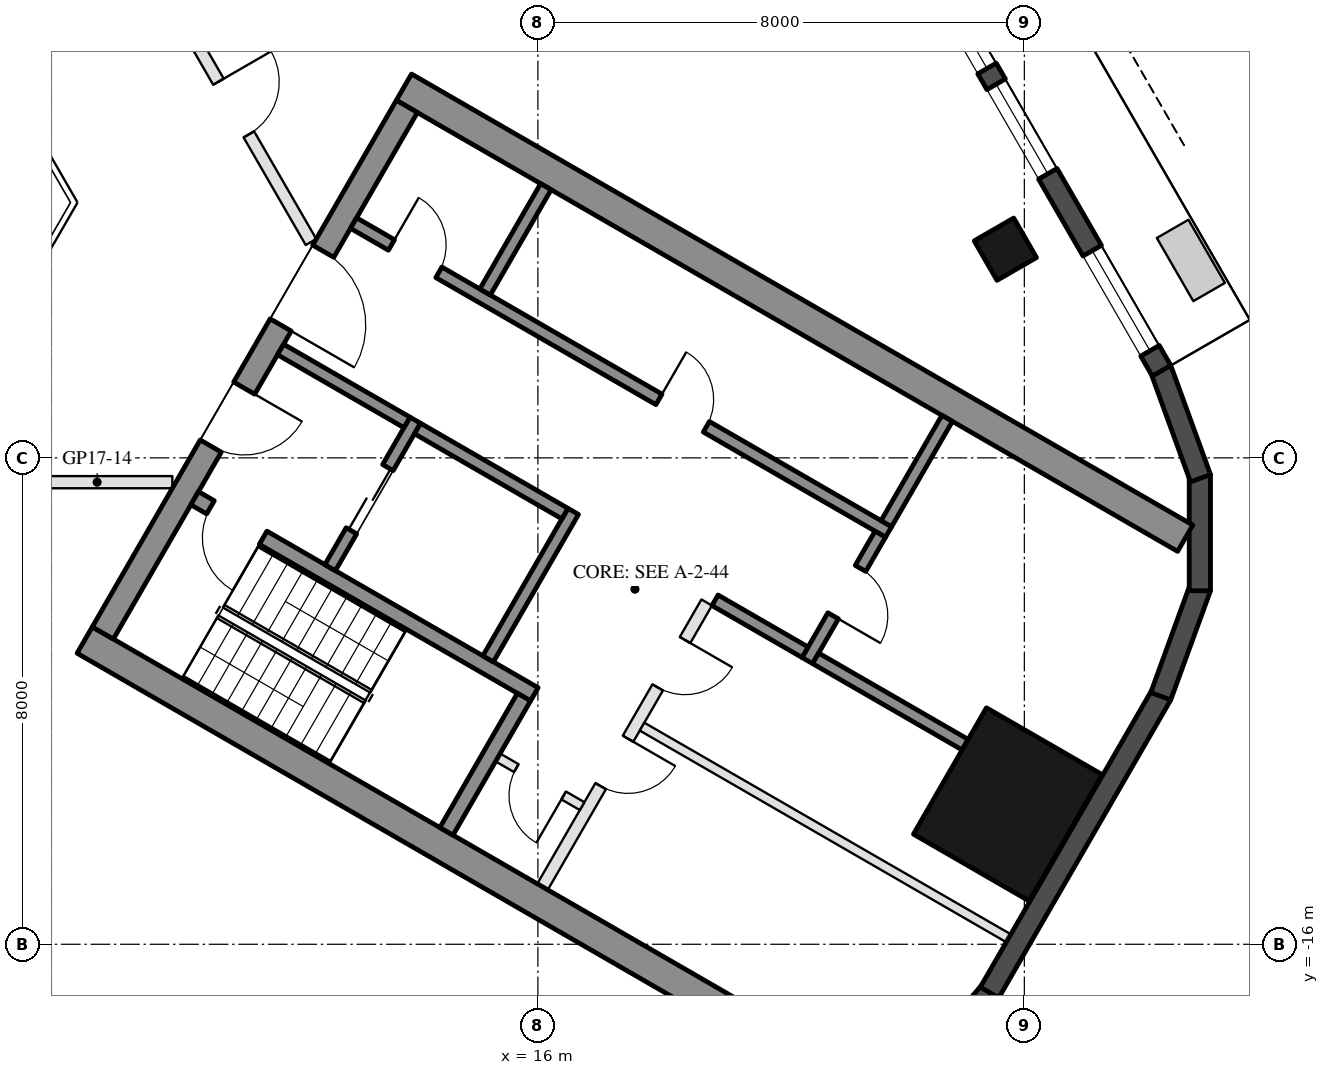
"""IFC4 building model, lengths in metres.
Left out: names, types, materials, properties, quantities, classifications, styles, units other than length and angle.
Written with IfcOpenShell. Run it as: python <this file> out.ifc"""

import sys

from ifc_helpers import new_model, si_unit, direction, frame, frame_2d, origin, origin_2d, place, context, subcontext, project, spatial, rectangle, hollow_rectangle, extrude, element, fill, save


model = new_model("IFC4")
c1 = context("Model", 3, precision=1e-05, world=origin(), true_north=direction((0.0, 1.0)))
c2 = subcontext(c1, "Body", "Model", "MODEL_VIEW")
j1 = project(units=[si_unit("LENGTHUNIT", "METRE"), si_unit("PLANEANGLEUNIT", "RADIAN")], contexts=[c1])
p1 = place(None, origin())
s1 = spatial("IfcSite", under=j1, at=p1, CompositionType="ELEMENT")
p2 = place(p1, origin())
s2 = spatial("IfcBuilding", under=s1, at=p2, CompositionType="ELEMENT")
p3 = place(p2, frame((0.0, 0.0, 187.3)))
s3 = spatial("IfcBuildingStorey", under=s2, at=p3, CompositionType="ELEMENT", Elevation=187.3)
p4 = place(p3, frame((23.688, -4.568, 0.0), z_axis=(0.0, 0.0, 1.0), x_axis=(-0.5, 0.866025403784, 0.0)))
e1 = element("IfcColumn", 1, at=p4, inside=s3, PredefinedType="COLUMN", context=c2, shape_type="SweptSolid", body=[
    extrude(hollow_rectangle(XDim=0.75, YDim=0.75, WallThickness=0.035, at=origin_2d()), origin(), (0.0, 0.0, 1.0), 3.7),
])
p5 = place(p3, frame((23.729, -13.7, 0.0), z_axis=(0.0, 0.0, 1.0), x_axis=(0.5, 0.866025403784, 0.0)))
e2 = element("IfcColumn", 2, at=p5, inside=s3, PredefinedType="COLUMN", context=c2, shape_type="SweptSolid", body=[
    extrude(hollow_rectangle(XDim=2.4, YDim=2.2, WallThickness=0.06, at=origin_2d()), origin(), (0.0, 0.0, 1.0), 3.7),
])
p6 = place(p3, frame((22.217, -18.231, 0.0), z_axis=(0.0, 0.0, 1.0), x_axis=(0.642733291068, 0.76609001857, 0.0)))
e3 = element("IfcWall", 3, at=p6, inside=s3, PredefinedType="SOLIDWALL", context=c2, shape_type="SweptSolid", body=[
    extrude(rectangle(XDim=1.91, YDim=0.35, at=frame_2d((0.955, 0.0))), origin(), (0.0, 0.0, 1.0), 3.55),
])
p7 = place(p3, frame((23.427, -16.792, 0.0), z_axis=(0.0, 0.0, 1.0), x_axis=(0.500018773155, 0.866014564827, 0.0)))
e4 = element("IfcWall", 4, at=p7, inside=s3, PredefinedType="SOLIDWALL", context=c2, shape_type="SweptSolid", body=[
    extrude(rectangle(XDim=5.658, YDim=0.35, at=frame_2d((2.829, 0.0))), origin(), (0.0, 0.0, 1.0), 3.55),
])
for number, where, z_axis, x_axis in (
    (5, (26.244, -11.92, 0.0), (0.0, 0.0, 1.0), (0.342, 0.94, 0.0)),
    (6, (26.886, -10.185, 0.0), (0.0, 0.0, 1.0), (0.0, 1.0, 0.0)),
    (7, (26.897, -8.335, 0.0), (0.0, 0.0, 1.0), (-0.342, 0.94, 0.0)),
):
    element("IfcWall", number, at=place(p3, frame(where, z_axis=z_axis, x_axis=x_axis)), inside=s3, PredefinedType="SOLIDWALL", context=c2, shape_type="SweptSolid", body=[
        extrude(rectangle(XDim=1.91, YDim=0.35, at=frame_2d((0.955, 0.0))), origin(), (0.0, 0.0, 1.0), 3.55),
    ])
p8 = place(p3, frame((26.257, -6.567, 0.0), z_axis=(0.0, 0.0, 1.0), x_axis=(-0.500023526245, 0.866011820475, 0.0)))
e8 = element("IfcWall", 8, at=p8, inside=s3, PredefinedType="SOLIDWALL", context=c2, shape_type="SweptSolid", body=[
    extrude(rectangle(XDim=11.816, YDim=0.35, at=frame_2d((5.908, 0.0))), origin(), (0.0, 0.0, 1.0), 3.55),
])
p9 = place(p8, frame((0.38, 0.0, 0.3)))
e9 = element("IfcOpeningElement", 9, at=p9, cuts=e8, PredefinedType="OPENING", context=c2, shape_type="SweptSolid", body=[
    extrude(rectangle(XDim=1.9, YDim=2.65, at=frame_2d((0.95, 1.325))), frame((0.0, 0.185, 0.0), z_axis=(0.0, -1.0, 0.0), x_axis=(1.0, 0.0, 0.0)), (0.0, 0.0, 1.0), 0.37),
])
p10 = place(p8, frame((7.791, 0.0, 0.0)))
e10 = element("IfcOpeningElement", 10, at=p10, cuts=e8, PredefinedType="OPENING", context=c2, shape_type="SweptSolid", body=[
    extrude(rectangle(XDim=2.4, YDim=2.4, at=frame_2d((1.2, 1.2))), frame((0.0, 0.185, 0.0), z_axis=(0.0, -1.0, 0.0), x_axis=(1.0, 0.0, 0.0)), (0.0, 0.0, 1.0), 0.37),
])
p11 = place(p8, frame((3.741, 0.0, 0.3)))
e11 = element("IfcOpeningElement", 11, at=p11, cuts=e8, PredefinedType="OPENING", context=c2, shape_type="SweptSolid", body=[
    extrude(rectangle(XDim=1.7, YDim=2.65, at=frame_2d((0.85, 1.325))), frame((0.0, 0.185, 0.0), z_axis=(0.0, -1.0, 0.0), x_axis=(1.0, 0.0, 0.0)), (0.0, 0.0, 1.0), 0.37),
])
p12 = place(p8, frame((5.741, 0.0, 0.3)))
e12 = element("IfcOpeningElement", 12, at=p12, cuts=e8, PredefinedType="OPENING", context=c2, shape_type="SweptSolid", body=[
    extrude(rectangle(XDim=1.7, YDim=2.65, at=frame_2d((0.85, 1.325))), frame((0.0, 0.185, 0.0), z_axis=(0.0, -1.0, 0.0), x_axis=(1.0, 0.0, 0.0)), (0.0, 0.0, 1.0), 0.37),
])
for number, where, z_axis, x_axis in (
    (13, (8.547, -10.997, 0.0), (0.0, 0.0, 1.0), (0.866, -0.5, 0.0)),
    (14, (13.797, -1.903, 0.0), (0.0, 0.0, 1.0), (0.866, -0.5, 0.0)),
):
    element("IfcWall", number, at=place(p3, frame(where, z_axis=z_axis, x_axis=x_axis)), inside=s3, PredefinedType="SHEAR", context=c2, shape_type="SweptSolid", body=[
        extrude(rectangle(XDim=14.837, YDim=0.5, at=frame_2d((7.418, 0.0))), origin(), (0.0, 0.0, 1.0), 3.5),
    ])
p13 = place(p3, frame((8.845, -10.88, 0.0), z_axis=(0.0, 0.0, 1.0), x_axis=(0.500004234368, 0.866022959057, 0.0)))
e15 = element("IfcWall", 15, at=p13, inside=s3, PredefinedType="SHEAR", context=c2, shape_type="SweptSolid", body=[
    extrude(rectangle(XDim=10.0, YDim=0.4, at=frame_2d((5.0, 0.0))), origin(), (0.0, 0.0, 1.0), 3.5),
])
p14 = place(p13, frame((3.55, 0.0, 0.0)))
e16 = element("IfcOpeningElement", 16, at=p14, cuts=e15, PredefinedType="OPENING", context=c2, shape_type="SweptSolid", body=[
    extrude(rectangle(XDim=1.1, YDim=2.1, at=frame_2d((0.55, 1.05))), frame((0.0, 0.21, 0.0), z_axis=(0.0, -1.0, 0.0), x_axis=(1.0, 0.0, 0.0)), (0.0, 0.0, 1.0), 0.42),
])
p15 = place(p13, frame((5.85, 0.0, 0.0)))
e17 = element("IfcOpeningElement", 17, at=p15, cuts=e15, PredefinedType="OPENING", context=c2, shape_type="SweptSolid", body=[
    extrude(rectangle(XDim=1.4, YDim=2.1, at=frame_2d((0.7, 1.05))), frame((0.0, 0.21, 0.0), z_axis=(0.0, -1.0, 0.0), x_axis=(1.0, 0.0, 0.0)), (0.0, 0.0, 1.0), 0.42),
])
p16 = place(p3, frame((10.356, -8.664, 0.0), z_axis=(0.0, 0.0, 1.0), x_axis=(0.866028629588, -0.499994412703, 0.0)))
e18 = element("IfcWall", 18, at=p16, inside=s3, PredefinedType="SHEAR", context=c2, shape_type="SweptSolid", body=[
    extrude(rectangle(XDim=6.45, YDim=0.25, at=frame_2d((3.225, 0.0))), origin(), (0.0, 0.0, 1.0), 3.5),
])
p17 = place(p16, frame((0.3, 0.0, 0.0)))
e19 = element("IfcOpeningElement", 19, at=p17, cuts=e18, PredefinedType="OPENING", context=c2, shape_type="SweptSolid", body=[
    extrude(rectangle(XDim=1.0, YDim=2.1, at=frame_2d((0.5, 1.05))), frame((0.0, 0.135, 0.0), z_axis=(0.0, -1.0, 0.0), x_axis=(1.0, 0.0, 0.0)), (0.0, 0.0, 1.0), 0.27),
])
p18 = place(p3, frame((14.496, -14.143, 0.0), z_axis=(0.0, 0.0, 1.0), x_axis=(0.500062241894, 0.865989465428, 0.0)))
e20 = element("IfcWall", 20, at=p18, inside=s3, PredefinedType="SHEAR", context=c2, shape_type="SweptSolid", body=[
    extrude(rectangle(XDim=2.55, YDim=0.25, at=frame_2d((1.275, 0.0))), origin(), (0.0, 0.0, 1.0), 3.5),
])
p19 = place(p3, frame((15.181, -11.305, 0.0), z_axis=(0.0, 0.0, 1.0), x_axis=(0.49994636267, 0.866056369097, 0.0)))
e21 = element("IfcWall", 21, at=p19, inside=s3, PredefinedType="SHEAR", context=c2, shape_type="SweptSolid", body=[
    extrude(rectangle(XDim=2.8, YDim=0.2, at=frame_2d((1.4, 0.0))), origin(), (0.0, 0.0, 1.0), 3.5),
])
p20 = place(p3, frame((12.583, -9.805, 0.0), z_axis=(0.0, 0.0, 1.0), x_axis=(0.49994636267, 0.866056369097, 0.0)))
e22 = element("IfcWall", 22, at=p20, inside=s3, PredefinedType="SHEAR", context=c2, shape_type="SweptSolid", body=[
    extrude(rectangle(XDim=2.8, YDim=0.2, at=frame_2d((1.4, 0.0))), origin(), (0.0, 0.0, 1.0), 3.5),
])
p21 = place(p20, frame((0.7, 0.0, 0.0)))
e23 = element("IfcOpeningElement", 23, at=p21, cuts=e22, PredefinedType="OPENING", context=c2, shape_type="SweptSolid", body=[
    extrude(rectangle(XDim=1.2, YDim=2.1, at=frame_2d((0.6, 1.05))), frame((0.0, 0.11, 0.0), z_axis=(0.0, -1.0, 0.0), x_axis=(1.0, 0.0, 0.0)), (0.0, 0.0, 1.0), 0.22),
])
p22 = place(p3, frame((11.768, -6.217, 0.0), z_axis=(0.0, 0.0, 1.0), x_axis=(0.866050077142, -0.499957262057, 0.0)))
e24 = element("IfcWall", 24, at=p22, inside=s3, PredefinedType="SHEAR", context=c2, shape_type="SweptSolid", body=[
    extrude(rectangle(XDim=2.4, YDim=0.2, at=frame_2d((1.2, 0.0))), origin(), (0.0, 0.0, 1.0), 3.5),
])
p23 = place(p3, frame((14.02, -7.517, 0.0), z_axis=(0.0, 0.0, 1.0), x_axis=(0.866034573852, -0.49998411664, 0.0)))
e25 = element("IfcWall", 25, at=p23, inside=s3, PredefinedType="SHEAR", context=c2, shape_type="SweptSolid", body=[
    extrude(rectangle(XDim=2.8, YDim=0.2, at=frame_2d((1.4, 0.0))), origin(), (0.0, 0.0, 1.0), 3.5),
])
p24 = place(p3, frame((12.968, -4.138, 0.0), z_axis=(0.0, 0.0, 1.0), x_axis=(0.866028328073, -0.49999493495, 0.0)))
e26 = element("IfcWall", 26, at=p24, inside=s3, PredefinedType="SHEAR", context=c2, shape_type="SweptSolid", body=[
    extrude(rectangle(XDim=10.16, YDim=0.2, at=frame_2d((5.08, 0.0))), origin(), (0.0, 0.0, 1.0), 3.5),
])
p25 = place(p24, frame((0.72, 0.0, 0.0)))
e27 = element("IfcOpeningElement", 27, at=p25, cuts=e26, PredefinedType="OPENING", context=c2, shape_type="SweptSolid", body=[
    extrude(rectangle(XDim=0.9, YDim=2.1, at=frame_2d((0.45, 1.05))), frame((0.0, 0.11, 0.0), z_axis=(0.0, -1.0, 0.0), x_axis=(1.0, 0.0, 0.0)), (0.0, 0.0, 1.0), 0.22),
])
p26 = place(p24, frame((5.8, 0.0, 0.0)))
e28 = element("IfcOpeningElement", 28, at=p26, cuts=e26, PredefinedType="OPENING", context=c2, shape_type="SweptSolid", body=[
    extrude(rectangle(XDim=0.9, YDim=2.1, at=frame_2d((0.45, 1.05))), frame((0.0, 0.11, 0.0), z_axis=(0.0, -1.0, 0.0), x_axis=(1.0, 0.0, 0.0)), (0.0, 0.0, 1.0), 0.22),
])
p27 = place(p3, frame((20.43, -11.333, 0.0), z_axis=(0.0, 0.0, 1.0), x_axis=(0.500001309137, 0.866024647952, 0.0)))
e29 = element("IfcWall", 29, at=p27, inside=s3, PredefinedType="SHEAR", context=c2, shape_type="SweptSolid", body=[
    extrude(rectangle(XDim=2.4, YDim=0.2, at=frame_2d((1.2, 0.0))), origin(), (0.0, 0.0, 1.0), 3.5),
])
p28 = place(p27, frame((0.85, 0.0, 0.0)))
e30 = element("IfcOpeningElement", 30, at=p28, cuts=e29, PredefinedType="OPENING", context=c2, shape_type="SweptSolid", body=[
    extrude(rectangle(XDim=0.9, YDim=2.1, at=frame_2d((0.45, 1.05))), frame((0.0, 0.11, 0.0), z_axis=(0.0, -1.0, 0.0), x_axis=(1.0, 0.0, 0.0)), (0.0, 0.0, 1.0), 0.22),
])
p29 = place(p3, frame((18.913, -10.342, 0.0), z_axis=(0.0, 0.0, 1.0), x_axis=(0.866038183914, -0.499977863513, 0.0)))
e31 = element("IfcWall", 31, at=p29, inside=s3, PredefinedType="SHEAR", context=c2, shape_type="SweptSolid", body=[
    extrude(rectangle(XDim=1.71, YDim=0.2, at=frame_2d((0.855, 0.0))), origin(), (0.0, 0.0, 1.0), 3.5),
])
for number, where, z_axis, x_axis in (
    (32, (15.131, -5.272, 0.0), (0.0, 0.0, 1.0), (0.5, 0.866, 0.0)),
    (33, (21.73, -9.082, 0.0), (0.0, 0.0, 1.0), (0.5, 0.866, 0.0)),
):
    element("IfcWall", number, at=place(p3, frame(where, z_axis=z_axis, x_axis=x_axis)), inside=s3, PredefinedType="SHEAR", context=c2, shape_type="SweptSolid", body=[
        extrude(rectangle(XDim=2.0, YDim=0.2, at=frame_2d((1.0, 0.0))), origin(), (0.0, 0.0, 1.0), 3.5),
    ])
p30 = place(p3, frame((20.567, -11.297, 0.0), z_axis=(0.0, 0.0, 1.0), x_axis=(0.866055327414, -0.49994816717, 0.0)))
e34 = element("IfcWall", 34, at=p30, inside=s3, PredefinedType="SHEAR", context=c2, shape_type="SweptSolid", body=[
    extrude(rectangle(XDim=2.84, YDim=0.2, at=frame_2d((1.42, 0.0))), origin(), (0.0, 0.0, 1.0), 3.5),
])
p31 = place(p3, frame((16.076, -15.055, 0.0), z_axis=(0.0, 0.0, 1.0), x_axis=(0.499995103361, 0.866028230842, 0.0)))
e35 = element("IfcWall", 35, at=p31, inside=s3, PredefinedType="PARTITIONING", context=c2, shape_type="SweptSolid", body=[
    extrude(rectangle(XDim=5.4, YDim=0.2, at=frame_2d((2.7, 0.0))), origin(), (0.0, 0.0, 1.0), 3.5),
])
p32 = place(p31, frame((1.913, 0.0, 0.0)))
e36 = element("IfcOpeningElement", 36, at=p32, cuts=e35, PredefinedType="OPENING", context=c2, shape_type="SweptSolid", body=[
    extrude(rectangle(XDim=0.9, YDim=2.1, at=frame_2d((0.45, 1.05))), frame((0.0, 0.11, 0.0), z_axis=(0.0, -1.0, 0.0), x_axis=(1.0, 0.0, 0.0)), (0.0, 0.0, 1.0), 0.22),
])
p33 = place(p31, frame((3.788, 0.0, 0.0)))
e37 = element("IfcOpeningElement", 37, at=p33, cuts=e35, PredefinedType="OPENING", context=c2, shape_type="SweptSolid", body=[
    extrude(rectangle(XDim=0.9, YDim=2.1, at=frame_2d((0.45, 1.05))), frame((0.0, 0.11, 0.0), z_axis=(0.0, -1.0, 0.0), x_axis=(1.0, 0.0, 0.0)), (0.0, 0.0, 1.0), 0.22),
])
p34 = place(p3, frame((15.342, -12.928, 0.0), z_axis=(0.0, 0.0, 1.0), x_axis=(0.865989903783, -0.500061482766, 0.0)))
e38 = element("IfcWall", 38, at=p34, inside=s3, PredefinedType="PARTITIONING", context=c2, shape_type="SweptSolid", body=[
    extrude(rectangle(XDim=1.6, YDim=0.15, at=frame_2d((0.8, 0.0))), origin(), (0.0, 0.0, 1.0), 3.5),
])
p35 = place(p34, frame((0.35, 0.0, 0.0)))
e39 = element("IfcOpeningElement", 39, at=p35, cuts=e38, PredefinedType="OPENING", context=c2, shape_type="SweptSolid", body=[
    extrude(rectangle(XDim=0.9, YDim=2.1, at=frame_2d((0.45, 1.05))), frame((0.0, 0.085, 0.0), z_axis=(0.0, -1.0, 0.0), x_axis=(1.0, 0.0, 0.0)), (0.0, 0.0, 1.0), 0.17),
])
p36 = place(p3, frame((17.713, -12.42, 0.0), z_axis=(0.0, 0.0, 1.0), x_axis=(0.866016523273, -0.500015381182, 0.0)))
e40 = element("IfcWall", 40, at=p36, inside=s3, PredefinedType="PARTITIONING", context=c2, shape_type="SweptSolid", body=[
    extrude(rectangle(XDim=6.95, YDim=0.15, at=frame_2d((3.475, 0.0))), origin(), (0.0, 0.0, 1.0), 3.5),
])
p37 = place(p3, frame((9.988, -8.4, 0.0), z_axis=(0.0, 0.0, 1.0), x_axis=(-1.0, 0.0, 0.0)))
e41 = element("IfcWall", 41, at=p37, inside=s3, PredefinedType="PARTITIONING", context=c2, shape_type="SweptSolid", body=[
    extrude(rectangle(XDim=6.185, YDim=0.2, at=frame_2d((3.092, 0.0))), origin(), (0.0, 0.0, 1.0), 2.95),
])
p38 = place(p37, frame((2.592, 0.0, 0.0)))
e42 = element("IfcOpeningElement", 42, at=p38, cuts=e41, PredefinedType="OPENING", context=c2, shape_type="SweptSolid", body=[
    extrude(rectangle(XDim=1.0, YDim=2.1, at=frame_2d((0.5, 1.05))), frame((0.0, 0.11, 0.0), z_axis=(0.0, -1.0, 0.0), x_axis=(1.0, 0.0, 0.0)), (0.0, 0.0, 1.0), 0.22),
])
p39 = place(p3, frame((9.725, -0.043, 0.0), z_axis=(0.0, 0.0, 1.0), x_axis=(0.500014573982, -0.866016989329, 0.0)))
e43 = element("IfcWall", 43, at=p39, inside=s3, PredefinedType="PARTITIONING", context=c2, shape_type="SweptSolid", body=[
    extrude(rectangle(XDim=5.088, YDim=0.2, at=frame_2d((2.544, 0.0))), origin(), (0.0, 0.0, 1.0), 2.95),
])
p40 = place(p39, frame((2.044, 0.0, 0.0)))
e44 = element("IfcOpeningElement", 44, at=p40, cuts=e43, PredefinedType="OPENING", context=c2, shape_type="SweptSolid", body=[
    extrude(rectangle(XDim=1.0, YDim=2.1, at=frame_2d((0.5, 1.05))), frame((0.0, 0.11, 0.0), z_axis=(0.0, -1.0, 0.0), x_axis=(1.0, 0.0, 0.0)), (0.0, 0.0, 1.0), 0.22),
])
p41 = place(p9, origin())
e45 = element("IfcWindow", 45, at=p41, inside=s3, PartitioningType="SINGLE_PANEL", PredefinedType="WINDOW", context=c2, shape_type="SweptSolid", body=[
    extrude(rectangle(XDim=1.9, YDim=2.65, at=frame_2d((0.95, 1.325))), frame((0.0, 0.03, 0.0), z_axis=(0.0, -1.0, 0.0), x_axis=(1.0, 0.0, 0.0)), (0.0, 0.0, 1.0), 0.06),
])
fill(e9, e45)
p42 = place(p11, origin())
e46 = element("IfcWindow", 46, at=p42, inside=s3, PartitioningType="SINGLE_PANEL", PredefinedType="WINDOW", context=c2, shape_type="SweptSolid", body=[
    extrude(rectangle(XDim=1.7, YDim=2.65, at=frame_2d((0.85, 1.325))), frame((0.0, 0.03, 0.0), z_axis=(0.0, -1.0, 0.0), x_axis=(1.0, 0.0, 0.0)), (0.0, 0.0, 1.0), 0.06),
])
fill(e11, e46)
p43 = place(p12, origin())
e47 = element("IfcWindow", 47, at=p43, inside=s3, PartitioningType="SINGLE_PANEL", PredefinedType="WINDOW", context=c2, shape_type="SweptSolid", body=[
    extrude(rectangle(XDim=1.7, YDim=2.65, at=frame_2d((0.85, 1.325))), frame((0.0, 0.03, 0.0), z_axis=(0.0, -1.0, 0.0), x_axis=(1.0, 0.0, 0.0)), (0.0, 0.0, 1.0), 0.06),
])
fill(e12, e47)
p44 = place(p21, origin())
e48 = element("IfcDoor", 48, at=p44, inside=s3, OperationType="DOUBLE_DOOR_SLIDING", PredefinedType="DOOR", context=c2, shape_type="SweptSolid", body=[
    extrude(rectangle(XDim=1.2, YDim=2.1, at=frame_2d((0.6, 1.05))), frame((0.0, 0.025, 0.0), z_axis=(0.0, -1.0, 0.0), x_axis=(1.0, 0.0, 0.0)), (0.0, 0.0, 1.0), 0.05),
])
fill(e23, e48)
p45 = place(p35, frame((0.9, 0.0, 0.0), z_axis=(0.0, 0.0, 1.0), x_axis=(-1.0, 0.0, 0.0)))
e49 = element("IfcDoor", 49, at=p45, inside=s3, OperationType="SINGLE_SWING_LEFT", PredefinedType="DOOR", context=c2, shape_type="SweptSolid", body=[
    extrude(rectangle(XDim=0.9, YDim=2.1, at=frame_2d((0.45, 1.05))), frame((0.0, 0.025, 0.0), z_axis=(0.0, -1.0, 0.0), x_axis=(1.0, 0.0, 0.0)), (0.0, 0.0, 1.0), 0.05),
])
fill(e39, e49)
p46 = place(p25, origin())
e50 = element("IfcDoor", 50, at=p46, inside=s3, OperationType="SINGLE_SWING_LEFT", PredefinedType="DOOR", context=c2, shape_type="SweptSolid", body=[
    extrude(rectangle(XDim=0.9, YDim=2.1, at=frame_2d((0.45, 1.05))), frame((0.0, 0.025, 0.0), z_axis=(0.0, -1.0, 0.0), x_axis=(1.0, 0.0, 0.0)), (0.0, 0.0, 1.0), 0.05),
])
fill(e27, e50)
p47 = place(p26, origin())
e51 = element("IfcDoor", 51, at=p47, inside=s3, OperationType="SINGLE_SWING_LEFT", PredefinedType="DOOR", context=c2, shape_type="SweptSolid", body=[
    extrude(rectangle(XDim=0.9, YDim=2.1, at=frame_2d((0.45, 1.05))), frame((0.0, 0.025, 0.0), z_axis=(0.0, -1.0, 0.0), x_axis=(1.0, 0.0, 0.0)), (0.0, 0.0, 1.0), 0.05),
])
fill(e28, e51)
p48 = place(p28, frame((0.9, 0.0, 0.0), z_axis=(0.0, 0.0, 1.0), x_axis=(-1.0, 0.0, 0.0)))
e52 = element("IfcDoor", 52, at=p48, inside=s3, OperationType="SINGLE_SWING_RIGHT", PredefinedType="DOOR", context=c2, shape_type="SweptSolid", body=[
    extrude(rectangle(XDim=0.9, YDim=2.1, at=frame_2d((0.45, 1.05))), frame((0.0, 0.025, 0.0), z_axis=(0.0, -1.0, 0.0), x_axis=(1.0, 0.0, 0.0)), (0.0, 0.0, 1.0), 0.05),
])
fill(e30, e52)
p49 = place(p32, frame((0.9, 0.0, 0.0), z_axis=(0.0, 0.0, 1.0), x_axis=(-1.0, 0.0, 0.0)))
e53 = element("IfcDoor", 53, at=p49, inside=s3, OperationType="SINGLE_SWING_LEFT", PredefinedType="DOOR", context=c2, shape_type="SweptSolid", body=[
    extrude(rectangle(XDim=0.9, YDim=2.1, at=frame_2d((0.45, 1.05))), frame((0.0, 0.025, 0.0), z_axis=(0.0, -1.0, 0.0), x_axis=(1.0, 0.0, 0.0)), (0.0, 0.0, 1.0), 0.05),
])
fill(e36, e53)
p50 = place(p33, frame((0.9, 0.0, 0.0), z_axis=(0.0, 0.0, 1.0), x_axis=(-1.0, 0.0, 0.0)))
e54 = element("IfcDoor", 54, at=p50, inside=s3, OperationType="SINGLE_SWING_LEFT", PredefinedType="DOOR", context=c2, shape_type="SweptSolid", body=[
    extrude(rectangle(XDim=0.9, YDim=2.1, at=frame_2d((0.45, 1.05))), frame((0.0, 0.025, 0.0), z_axis=(0.0, -1.0, 0.0), x_axis=(1.0, 0.0, 0.0)), (0.0, 0.0, 1.0), 0.05),
])
fill(e37, e54)
p51 = place(p14, frame((1.1, 0.0, 0.0), z_axis=(0.0, 0.0, 1.0), x_axis=(-1.0, 0.0, 0.0)))
e55 = element("IfcDoor", 55, at=p51, inside=s3, OperationType="SINGLE_SWING_LEFT", PredefinedType="DOOR", context=c2, shape_type="SweptSolid", body=[
    extrude(rectangle(XDim=1.1, YDim=2.1, at=frame_2d((0.55, 1.05))), frame((0.0, 0.025, 0.0), z_axis=(0.0, -1.0, 0.0), x_axis=(1.0, 0.0, 0.0)), (0.0, 0.0, 1.0), 0.05),
])
fill(e16, e55)
p52 = place(p15, frame((1.4, 0.0, 0.0), z_axis=(0.0, 0.0, 1.0), x_axis=(-1.0, 0.0, 0.0)))
e56 = element("IfcDoor", 56, at=p52, inside=s3, OperationType="DOUBLE_DOOR_SINGLE_SWING", PredefinedType="DOOR", context=c2, shape_type="SweptSolid", body=[
    extrude(rectangle(XDim=1.4, YDim=2.1, at=frame_2d((0.7, 1.05))), frame((0.0, 0.025, 0.0), z_axis=(0.0, -1.0, 0.0), x_axis=(1.0, 0.0, 0.0)), (0.0, 0.0, 1.0), 0.05),
])
fill(e17, e56)
p53 = place(p17, frame((1.0, 0.0, 0.0), z_axis=(0.0, 0.0, 1.0), x_axis=(-1.0, 0.0, 0.0)))
e57 = element("IfcDoor", 57, at=p53, inside=s3, OperationType="SINGLE_SWING_LEFT", PredefinedType="DOOR", context=c2, shape_type="SweptSolid", body=[
    extrude(rectangle(XDim=1.0, YDim=2.1, at=frame_2d((0.5, 1.05))), frame((0.0, 0.025, 0.0), z_axis=(0.0, -1.0, 0.0), x_axis=(1.0, 0.0, 0.0)), (0.0, 0.0, 1.0), 0.05),
])
fill(e19, e57)
p54 = place(p40, origin())
e58 = element("IfcDoor", 58, at=p54, inside=s3, OperationType="SINGLE_SWING_LEFT", PredefinedType="DOOR", context=c2, shape_type="SweptSolid", body=[
    extrude(rectangle(XDim=1.0, YDim=2.1, at=frame_2d((0.5, 1.05))), frame((0.0, 0.025, 0.0), z_axis=(0.0, -1.0, 0.0), x_axis=(1.0, 0.0, 0.0)), (0.0, 0.0, 1.0), 0.05),
])
fill(e44, e58)
save(model, sys.argv[1])
